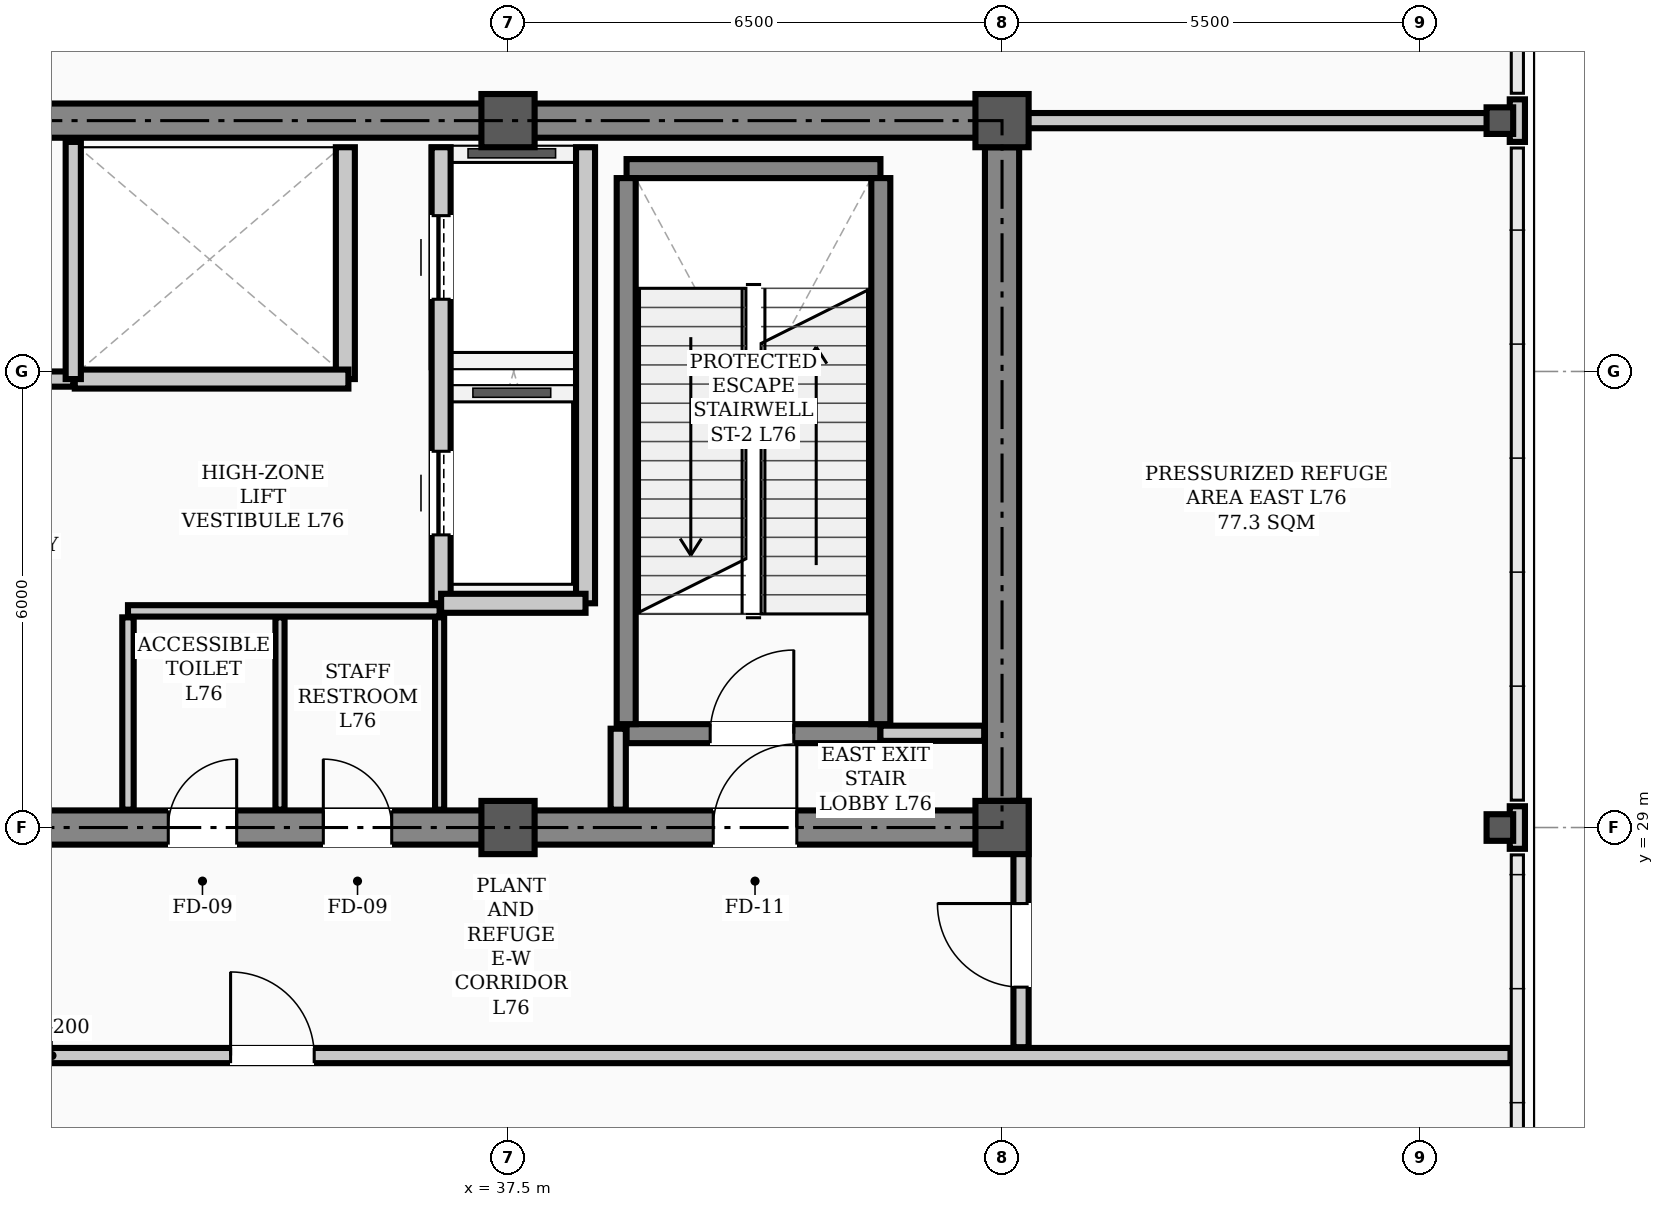
"""IFC4 building model, lengths in metres.
Left out: names, types, materials, properties, quantities, classifications, styles, units other than length and angle.
Written with IfcOpenShell. Run it as: python <this file> out.ifc"""

import sys

from ifc_helpers import new_model, si_unit, direction, frame, frame_2d, origin, origin_2d, place, context, subcontext, project, spatial, rectangle, hollow_rectangle, extrude, element, fill, save


model = new_model("IFC4")
c1 = context("Model", 3, precision=1e-05, world=origin(), true_north=direction((0.0, 1.0)))
c2 = subcontext(c1, "Body", "Model", "MODEL_VIEW")
j1 = project(units=[si_unit("LENGTHUNIT", "METRE"), si_unit("PLANEANGLEUNIT", "RADIAN")], contexts=[c1])
p1 = place(None, origin())
s1 = spatial("IfcSite", under=j1, at=p1, CompositionType="ELEMENT")
p2 = place(p1, origin())
s2 = spatial("IfcBuilding", under=s1, at=p2, CompositionType="ELEMENT")
p3 = place(p2, frame((0.0, 0.0, 306.0)))
s3 = spatial("IfcBuildingStorey", under=s2, at=p3, CompositionType="ELEMENT", Elevation=306.0)
for number, where, z_axis, x_axis in (
    (1, (37.5, 29.0, 0.0), (0.0, 0.0, 1.0), (1.0, 0.0, 0.0)),
    (2, (37.5, 38.3, 0.0), (0.0, 0.0, 1.0), (1.0, 0.0, 0.0)),
    (3, (44.0, 29.0, 0.0), (0.0, 0.0, 1.0), (1.0, 0.0, 0.0)),
    (4, (44.0, 38.3, 0.0), (0.0, 0.0, 1.0), (1.0, 0.0, 0.0)),
):
    element("IfcColumn", number, at=place(p3, frame(where, z_axis=z_axis, x_axis=x_axis)), inside=s3, PredefinedType="COLUMN", context=c2, shape_type="SweptSolid", body=[
        extrude(hollow_rectangle(XDim=0.7, YDim=0.7, WallThickness=0.028, InnerFilletRadius=0.014, OuterFilletRadius=0.042, at=origin_2d()), origin(), (0.0, 0.0, 1.0), 6.6),
    ])
for number, where, z_axis, x_axis in (
    (5, (50.55, 29.0, 0.0), (0.0, 0.0, 1.0), (1.0, 0.0, 0.0)),
    (6, (50.55, 38.3, 0.0), (0.0, 0.0, 1.0), (1.0, 0.0, 0.0)),
):
    element("IfcColumn", number, at=place(p3, frame(where, z_axis=z_axis, x_axis=x_axis)), inside=s3, PredefinedType="COLUMN", context=c2, shape_type="SweptSolid", body=[
        extrude(hollow_rectangle(XDim=0.35, YDim=0.35, WallThickness=0.016, InnerFilletRadius=0.016, OuterFilletRadius=0.032, at=origin_2d()), origin(), (0.0, 0.0, 1.0), 6.6),
    ])
for number, where, z_axis, x_axis in (
    (7, (50.78, 28.72, 0.0), (0.0, 0.0, 1.0), (0.0, 1.0, 0.0)),
    (8, (50.78, 38.02, 0.0), (0.0, 0.0, 1.0), (0.0, 1.0, 0.0)),
):
    element("IfcWall", number, at=place(p3, frame(where, z_axis=z_axis, x_axis=x_axis)), inside=s3, PredefinedType="PARAPET", context=c2, shape_type="SweptSolid", body=[
        extrude(rectangle(XDim=0.56, YDim=0.2, at=frame_2d((0.28, 0.0))), origin(), (0.0, 0.0, 1.0), 1.2),
    ])
p4 = place(p3, frame((13.5, 29.0, 0.0), z_axis=(0.0, 0.0, 1.0), x_axis=(1.0, 0.0, 0.0)))
e9 = element("IfcWall", 9, at=p4, inside=s3, PredefinedType="SHEAR", context=c2, shape_type="SweptSolid", body=[
    extrude(rectangle(XDim=30.5, YDim=0.45, at=frame_2d((15.25, 0.0))), origin(), (0.0, 0.0, 1.0), 6.34),
])
p5 = place(p4, frame((1.75, 0.0, 0.0)))
e10 = element("IfcOpeningElement", 10, at=p5, cuts=e9, PredefinedType="OPENING", context=c2, shape_type="SweptSolid", body=[
    extrude(rectangle(XDim=1.1, YDim=2.08, at=frame_2d((0.55, 1.04))), frame((0.0, 0.235, 0.0), z_axis=(0.0, -1.0, 0.0), x_axis=(1.0, 0.0, 0.0)), (0.0, 0.0, 1.0), 0.47),
])
p6 = place(p4, frame((26.7, 0.0, 0.0)))
e11 = element("IfcOpeningElement", 11, at=p6, cuts=e9, PredefinedType="OPENING", context=c2, shape_type="SweptSolid", body=[
    extrude(rectangle(XDim=1.1, YDim=2.08, at=frame_2d((0.55, 1.04))), frame((0.0, 0.235, 0.0), z_axis=(0.0, -1.0, 0.0), x_axis=(1.0, 0.0, 0.0)), (0.0, 0.0, 1.0), 0.47),
])
p7 = place(p4, frame((6.8, 0.0, 0.0)))
e12 = element("IfcOpeningElement", 12, at=p7, cuts=e9, PredefinedType="OPENING", context=c2, shape_type="SweptSolid", body=[
    extrude(rectangle(XDim=1.1, YDim=2.08, at=frame_2d((0.55, 1.04))), frame((0.0, 0.235, 0.0), z_axis=(0.0, -1.0, 0.0), x_axis=(1.0, 0.0, 0.0)), (0.0, 0.0, 1.0), 0.47),
])
p8 = place(p4, frame((13.2, 0.0, 0.0)))
e13 = element("IfcOpeningElement", 13, at=p8, cuts=e9, PredefinedType="OPENING", context=c2, shape_type="SweptSolid", body=[
    extrude(rectangle(XDim=1.6, YDim=2.08, at=frame_2d((0.8, 1.04))), frame((0.0, 0.235, 0.0), z_axis=(0.0, -1.0, 0.0), x_axis=(1.0, 0.0, 0.0)), (0.0, 0.0, 1.0), 0.47),
])
p9 = place(p4, frame((19.53, 0.0, 0.0)))
e14 = element("IfcOpeningElement", 14, at=p9, cuts=e9, PredefinedType="OPENING", context=c2, shape_type="SweptSolid", body=[
    extrude(rectangle(XDim=0.9, YDim=2.08, at=frame_2d((0.45, 1.04))), frame((0.0, 0.235, 0.0), z_axis=(0.0, -1.0, 0.0), x_axis=(1.0, 0.0, 0.0)), (0.0, 0.0, 1.0), 0.47),
])
p10 = place(p4, frame((21.57, 0.0, 0.0)))
e15 = element("IfcOpeningElement", 15, at=p10, cuts=e9, PredefinedType="OPENING", context=c2, shape_type="SweptSolid", body=[
    extrude(rectangle(XDim=0.9, YDim=2.08, at=frame_2d((0.45, 1.04))), frame((0.0, 0.235, 0.0), z_axis=(0.0, -1.0, 0.0), x_axis=(1.0, 0.0, 0.0)), (0.0, 0.0, 1.0), 0.47),
])
p11 = place(p3, frame((13.5, 38.3, 0.0), z_axis=(0.0, 0.0, 1.0), x_axis=(1.0, 0.0, 0.0)))
e16 = element("IfcWall", 16, at=p11, inside=s3, PredefinedType="SHEAR", context=c2, shape_type="SweptSolid", body=[
    extrude(rectangle(XDim=30.5, YDim=0.45, at=frame_2d((15.25, 0.0))), origin(), (0.0, 0.0, 1.0), 6.34),
])
p12 = place(p3, frame((44.0, 29.35, 0.0), z_axis=(0.0, 0.0, 1.0), x_axis=(0.0, 1.0, 0.0)))
e17 = element("IfcWall", 17, at=p12, inside=s3, PredefinedType="SHEAR", context=c2, shape_type="SweptSolid", body=[
    extrude(rectangle(XDim=8.6, YDim=0.45, at=frame_2d((4.3, 0.0))), origin(), (0.0, 0.0, 1.0), 6.34),
])
p13 = place(p3, frame((39.06, 30.235, 0.0), z_axis=(0.0, 0.0, 1.0), x_axis=(1.0, 0.0, 0.0)))
e18 = element("IfcWall", 18, at=p13, inside=s3, PredefinedType="STANDARD", context=c2, shape_type="SweptSolid", body=[
    extrude(rectangle(XDim=3.34, YDim=0.25, at=frame_2d((1.67, 0.0))), origin(), (0.0, 0.0, 1.0), 6.34),
])
p14 = place(p13, frame((1.1, 0.0, 0.0)))
e19 = element("IfcOpeningElement", 19, at=p14, cuts=e18, PredefinedType="OPENING", context=c2, shape_type="SweptSolid", body=[
    extrude(rectangle(XDim=1.1, YDim=2.08, at=frame_2d((0.55, 1.04))), frame((0.0, 0.135, 0.0), z_axis=(0.0, -1.0, 0.0), x_axis=(1.0, 0.0, 0.0)), (0.0, 0.0, 1.0), 0.27),
])
p15 = place(p3, frame((39.06, 37.669, 0.0), z_axis=(0.0, 0.0, 1.0), x_axis=(1.0, 0.0, 0.0)))
e20 = element("IfcWall", 20, at=p15, inside=s3, PredefinedType="STANDARD", context=c2, shape_type="SweptSolid", body=[
    extrude(rectangle(XDim=3.34, YDim=0.25, at=frame_2d((1.67, 0.0))), origin(), (0.0, 0.0, 1.0), 6.34),
])
for number, where, z_axis, x_axis in (
    (21, (39.055, 30.36, 0.0), (0.0, 0.0, 1.0), (0.0, 1.0, 0.0)),
    (22, (42.405, 30.36, 0.0), (0.0, 0.0, 1.0), (0.0, 1.0, 0.0)),
):
    element("IfcWall", number, at=place(p3, frame(where, z_axis=z_axis, x_axis=x_axis)), inside=s3, PredefinedType="STANDARD", context=c2, shape_type="SweptSolid", body=[
        extrude(rectangle(XDim=7.184, YDim=0.25, at=frame_2d((3.592, 0.0))), origin(), (0.0, 0.0, 1.0), 6.34),
    ])
p16 = place(p3, frame((36.62, 31.95, 0.0), z_axis=(0.0, 0.0, 1.0), x_axis=(0.0, 1.0, 0.0)))
e23 = element("IfcWall", 23, at=p16, inside=s3, PredefinedType="STANDARD", context=c2, shape_type="SweptSolid", body=[
    extrude(rectangle(XDim=6.0, YDim=0.25, at=frame_2d((3.0, 0.0))), origin(), (0.0, 0.0, 1.0), 6.02),
])
p17 = place(p16, frame((0.9, 0.0, 0.0)))
e24 = element("IfcOpeningElement", 24, at=p17, cuts=e23, PredefinedType="OPENING", context=c2, shape_type="SweptSolid", body=[
    extrude(rectangle(XDim=1.1, YDim=2.08, at=frame_2d((0.55, 1.04))), frame((0.0, 0.135, 0.0), z_axis=(0.0, -1.0, 0.0), x_axis=(1.0, 0.0, 0.0)), (0.0, 0.0, 1.0), 0.27),
])
p18 = place(p16, frame((4.0, 0.0, 0.0)))
e25 = element("IfcOpeningElement", 25, at=p18, cuts=e23, PredefinedType="OPENING", context=c2, shape_type="SweptSolid", body=[
    extrude(rectangle(XDim=1.1, YDim=2.08, at=frame_2d((0.55, 1.04))), frame((0.0, 0.135, 0.0), z_axis=(0.0, -1.0, 0.0), x_axis=(1.0, 0.0, 0.0)), (0.0, 0.0, 1.0), 0.27),
])
p19 = place(p3, frame((38.52, 31.95, 0.0), z_axis=(0.0, 0.0, 1.0), x_axis=(0.0, 1.0, 0.0)))
e26 = element("IfcWall", 26, at=p19, inside=s3, PredefinedType="STANDARD", context=c2, shape_type="SweptSolid", body=[
    extrude(rectangle(XDim=6.0, YDim=0.25, at=frame_2d((3.0, 0.0))), origin(), (0.0, 0.0, 1.0), 6.02),
])
p20 = place(p3, frame((36.62, 31.95, 0.0), z_axis=(0.0, 0.0, 1.0), x_axis=(1.0, 0.0, 0.0)))
e27 = element("IfcWall", 27, at=p20, inside=s3, PredefinedType="STANDARD", context=c2, shape_type="SweptSolid", body=[
    extrude(rectangle(XDim=1.9, YDim=0.25, at=frame_2d((0.95, 0.0))), origin(), (0.0, 0.0, 1.0), 6.18),
])
p21 = place(p3, frame((35.36, 34.9, 0.0), z_axis=(0.0, 0.0, 1.0), x_axis=(0.0, 1.0, 0.0)))
e28 = element("IfcWall", 28, at=p21, inside=s3, PredefinedType="STANDARD", context=c2, shape_type="SweptSolid", body=[
    extrude(rectangle(XDim=3.05, YDim=0.25, at=frame_2d((1.525, 0.0))), origin(), (0.0, 0.0, 1.0), 6.02),
])
p22 = place(p3, frame((31.8, 34.9, 0.0), z_axis=(0.0, 0.0, 1.0), x_axis=(1.0, 0.0, 0.0)))
e29 = element("IfcWall", 29, at=p22, inside=s3, PredefinedType="STANDARD", context=c2, shape_type="SweptSolid", body=[
    extrude(rectangle(XDim=3.6, YDim=0.25, at=frame_2d((1.8, 0.0))), origin(), (0.0, 0.0, 1.0), 6.34),
])
p23 = place(p3, frame((42.4, 30.24, 0.0), z_axis=(0.0, 0.0, 1.0), x_axis=(1.0, 0.0, 0.0)))
e30 = element("IfcWall", 30, at=p23, inside=s3, PredefinedType="STANDARD", context=c2, shape_type="SweptSolid", body=[
    extrude(rectangle(XDim=1.365, YDim=0.2, at=frame_2d((0.683, 0.0))), origin(), (0.0, 0.0, 1.0), 5.82),
])
p24 = place(p3, frame((23.6, 34.9, 0.0), z_axis=(0.0, 0.0, 1.0), x_axis=(1.0, 0.0, 0.0)))
e31 = element("IfcWall", 31, at=p24, inside=s3, PredefinedType="STANDARD", context=c2, shape_type="SweptSolid", body=[
    extrude(rectangle(XDim=8.18, YDim=0.2, at=frame_2d((4.09, 0.0))), origin(), (0.0, 0.0, 1.0), 6.34),
])
p25 = place(p24, frame((3.45, 0.0, 0.0)))
e32 = element("IfcOpeningElement", 32, at=p25, cuts=e31, PredefinedType="OPENING", context=c2, shape_type="SweptSolid", body=[
    extrude(rectangle(XDim=1.1, YDim=2.08, at=frame_2d((0.55, 1.04))), frame((0.0, 0.11, 0.0), z_axis=(0.0, -1.0, 0.0), x_axis=(1.0, 0.0, 0.0)), (0.0, 0.0, 1.0), 0.22),
])
p26 = place(p3, frame((32.5, 31.85, 0.0), z_axis=(0.0, 0.0, 1.0), x_axis=(1.0, 0.0, 0.0)))
e33 = element("IfcWall", 33, at=p26, inside=s3, PredefinedType="PARTITIONING", context=c2, shape_type="SweptSolid", body=[
    extrude(rectangle(XDim=4.1, YDim=0.15, at=frame_2d((2.05, 0.0))), origin(), (0.0, 0.0, 1.0), 6.34),
])
p27 = place(p3, frame((12.31, 26.0, 0.0), z_axis=(0.0, 0.0, 1.0), x_axis=(1.0, 0.0, 0.0)))
e34 = element("IfcWall", 34, at=p27, inside=s3, PredefinedType="STANDARD", context=c2, shape_type="SweptSolid", body=[
    extrude(rectangle(XDim=38.38, YDim=0.2, at=frame_2d((19.19, 0.0))), origin(), (0.0, 0.0, 1.0), 2.43),
])
p28 = place(p27, frame((6.34, 0.0, 0.0)))
e35 = element("IfcOpeningElement", 35, at=p28, cuts=e34, PredefinedType="OPENING", context=c2, shape_type="SweptSolid", body=[
    extrude(rectangle(XDim=1.1, YDim=2.08, at=frame_2d((0.55, 1.04))), frame((0.0, 0.11, 0.0), z_axis=(0.0, -1.0, 0.0), x_axis=(1.0, 0.0, 0.0)), (0.0, 0.0, 1.0), 0.22),
])
p29 = place(p27, frame((14.39, 0.0, 0.0)))
e36 = element("IfcOpeningElement", 36, at=p29, cuts=e34, PredefinedType="OPENING", context=c2, shape_type="SweptSolid", body=[
    extrude(rectangle(XDim=1.6, YDim=2.08, at=frame_2d((0.8, 1.04))), frame((0.0, 0.11, 0.0), z_axis=(0.0, -1.0, 0.0), x_axis=(1.0, 0.0, 0.0)), (0.0, 0.0, 1.0), 0.22),
])
p30 = place(p27, frame((21.54, 0.0, 0.0)))
e37 = element("IfcOpeningElement", 37, at=p30, cuts=e34, PredefinedType="OPENING", context=c2, shape_type="SweptSolid", body=[
    extrude(rectangle(XDim=1.1, YDim=2.08, at=frame_2d((0.55, 1.04))), frame((0.0, 0.11, 0.0), z_axis=(0.0, -1.0, 0.0), x_axis=(1.0, 0.0, 0.0)), (0.0, 0.0, 1.0), 0.22),
])
p31 = place(p3, frame((44.0, 38.3, 0.0), z_axis=(0.0, 0.0, 1.0), x_axis=(1.0, 0.0, 0.0)))
e38 = element("IfcWall", 38, at=p31, inside=s3, PredefinedType="STANDARD", context=c2, shape_type="SweptSolid", body=[
    extrude(rectangle(XDim=6.69, YDim=0.2, at=frame_2d((3.345, 0.0))), origin(), (0.0, 0.0, 1.0), 5.72),
])
p32 = place(p3, frame((38.95, 29.235, 0.0), z_axis=(0.0, 0.0, 1.0), x_axis=(0.0, 1.0, 0.0)))
e39 = element("IfcWall", 39, at=p32, inside=s3, PredefinedType="STANDARD", context=c2, shape_type="SweptSolid", body=[
    extrude(rectangle(XDim=1.065, YDim=0.2, at=frame_2d((0.532, 0.0))), origin(), (0.0, 0.0, 1.0), 6.02),
])
p33 = place(p3, frame((32.5, 29.235, 0.0), z_axis=(0.0, 0.0, 1.0), x_axis=(0.0, 1.0, 0.0)))
e40 = element("IfcWall", 40, at=p33, inside=s3, PredefinedType="PARTITIONING", context=c2, shape_type="SweptSolid", body=[
    extrude(rectangle(XDim=2.53, YDim=0.15, at=frame_2d((1.265, 0.0))), origin(), (0.0, 0.0, 1.0), 6.02),
])
for number, where, z_axis, x_axis in (
    (41, (36.6, 29.235, 0.0), (0.0, 0.0, 1.0), (0.0, 1.0, 0.0)),
    (42, (34.5, 29.235, 0.0), (0.0, 0.0, 1.0), (0.0, 1.0, 0.0)),
):
    element("IfcWall", number, at=place(p3, frame(where, z_axis=z_axis, x_axis=x_axis)), inside=s3, PredefinedType="PARTITIONING", context=c2, shape_type="SweptSolid", body=[
        extrude(rectangle(XDim=2.53, YDim=0.12, at=frame_2d((1.265, 0.0))), origin(), (0.0, 0.0, 1.0), 6.02),
    ])
p34 = place(p3, frame((44.25, 26.11, 0.0), z_axis=(0.0, 0.0, 1.0), x_axis=(0.0, 1.0, 0.0)))
e43 = element("IfcWall", 43, at=p34, inside=s3, PredefinedType="STANDARD", context=c2, shape_type="SweptSolid", body=[
    extrude(rectangle(XDim=3.24, YDim=0.2, at=frame_2d((1.62, 0.0))), origin(), (0.0, 0.0, 1.0), 5.72),
])
p35 = place(p34, frame((0.79, 0.0, 0.0)))
e44 = element("IfcOpeningElement", 44, at=p35, cuts=e43, PredefinedType="OPENING", context=c2, shape_type="SweptSolid", body=[
    extrude(rectangle(XDim=1.1, YDim=2.08, at=frame_2d((0.55, 1.04))), frame((0.0, 0.11, 0.0), z_axis=(0.0, -1.0, 0.0), x_axis=(1.0, 0.0, 0.0)), (0.0, 0.0, 1.0), 0.22),
])
p36 = place(p3, frame((31.78, 34.9, 0.0), z_axis=(0.0, 0.0, 1.0), x_axis=(0.0, 1.0, 0.0)))
e45 = element("IfcWall", 45, at=p36, inside=s3, PredefinedType="STANDARD", context=c2, shape_type="SweptSolid", body=[
    extrude(rectangle(XDim=3.12, YDim=0.2, at=frame_2d((1.56, 0.0))), origin(), (0.0, 0.0, 1.0), 6.02),
])
p37 = place(p14, origin())
e46 = element("IfcDoor", 46, at=p37, inside=s3, OperationType="SINGLE_SWING_RIGHT", PredefinedType="DOOR", context=c2, shape_type="SweptSolid", body=[
    extrude(rectangle(XDim=1.1, YDim=2.08, at=frame_2d((0.55, 1.04))), frame((0.0, 0.025, 0.0), z_axis=(0.0, -1.0, 0.0), x_axis=(1.0, 0.0, 0.0)), (0.0, 0.0, 1.0), 0.05),
])
fill(e19, e46)
p38 = place(p6, origin())
e47 = element("IfcDoor", 47, at=p38, inside=s3, OperationType="SINGLE_SWING_RIGHT", PredefinedType="DOOR", context=c2, shape_type="SweptSolid", body=[
    extrude(rectangle(XDim=1.1, YDim=2.08, at=frame_2d((0.55, 1.04))), frame((0.0, 0.025, 0.0), z_axis=(0.0, -1.0, 0.0), x_axis=(1.0, 0.0, 0.0)), (0.0, 0.0, 1.0), 0.05),
])
fill(e11, e47)
p39 = place(p9, origin())
e48 = element("IfcDoor", 48, at=p39, inside=s3, OperationType="SINGLE_SWING_RIGHT", PredefinedType="DOOR", context=c2, shape_type="SweptSolid", body=[
    extrude(rectangle(XDim=0.9, YDim=2.08, at=frame_2d((0.45, 1.04))), frame((0.0, 0.025, 0.0), z_axis=(0.0, -1.0, 0.0), x_axis=(1.0, 0.0, 0.0)), (0.0, 0.0, 1.0), 0.05),
])
fill(e14, e48)
p40 = place(p10, origin())
e49 = element("IfcDoor", 49, at=p40, inside=s3, OperationType="SINGLE_SWING_LEFT", PredefinedType="DOOR", context=c2, shape_type="SweptSolid", body=[
    extrude(rectangle(XDim=0.9, YDim=2.08, at=frame_2d((0.45, 1.04))), frame((0.0, 0.025, 0.0), z_axis=(0.0, -1.0, 0.0), x_axis=(1.0, 0.0, 0.0)), (0.0, 0.0, 1.0), 0.05),
])
fill(e15, e49)
p41 = place(p35, origin())
e50 = element("IfcDoor", 50, at=p41, inside=s3, OperationType="SINGLE_SWING_RIGHT", PredefinedType="DOOR", context=c2, shape_type="SweptSolid", body=[
    extrude(rectangle(XDim=1.1, YDim=2.08, at=frame_2d((0.55, 1.04))), frame((0.0, 0.025, 0.0), z_axis=(0.0, -1.0, 0.0), x_axis=(1.0, 0.0, 0.0)), (0.0, 0.0, 1.0), 0.05),
])
fill(e44, e50)
p42 = place(p30, origin())
e51 = element("IfcDoor", 51, at=p42, inside=s3, OperationType="SINGLE_SWING_LEFT", PredefinedType="DOOR", context=c2, shape_type="SweptSolid", body=[
    extrude(rectangle(XDim=1.1, YDim=2.08, at=frame_2d((0.55, 1.04))), frame((0.0, 0.025, 0.0), z_axis=(0.0, -1.0, 0.0), x_axis=(1.0, 0.0, 0.0)), (0.0, 0.0, 1.0), 0.05),
])
fill(e37, e51)
p43 = place(p17, origin())
e52 = element("IfcDoor", 52, at=p43, inside=s3, OperationType="SLIDING_TO_LEFT", PredefinedType="DOOR", context=c2, shape_type="SweptSolid", body=[
    extrude(rectangle(XDim=1.1, YDim=2.08, at=frame_2d((0.55, 1.04))), frame((0.0, 0.025, 0.0), z_axis=(0.0, -1.0, 0.0), x_axis=(1.0, 0.0, 0.0)), (0.0, 0.0, 1.0), 0.05),
])
fill(e24, e52)
p44 = place(p18, origin())
e53 = element("IfcDoor", 53, at=p44, inside=s3, OperationType="SLIDING_TO_LEFT", PredefinedType="DOOR", context=c2, shape_type="SweptSolid", body=[
    extrude(rectangle(XDim=1.1, YDim=2.08, at=frame_2d((0.55, 1.04))), frame((0.0, 0.025, 0.0), z_axis=(0.0, -1.0, 0.0), x_axis=(1.0, 0.0, 0.0)), (0.0, 0.0, 1.0), 0.05),
])
fill(e25, e53)
save(model, sys.argv[1])
